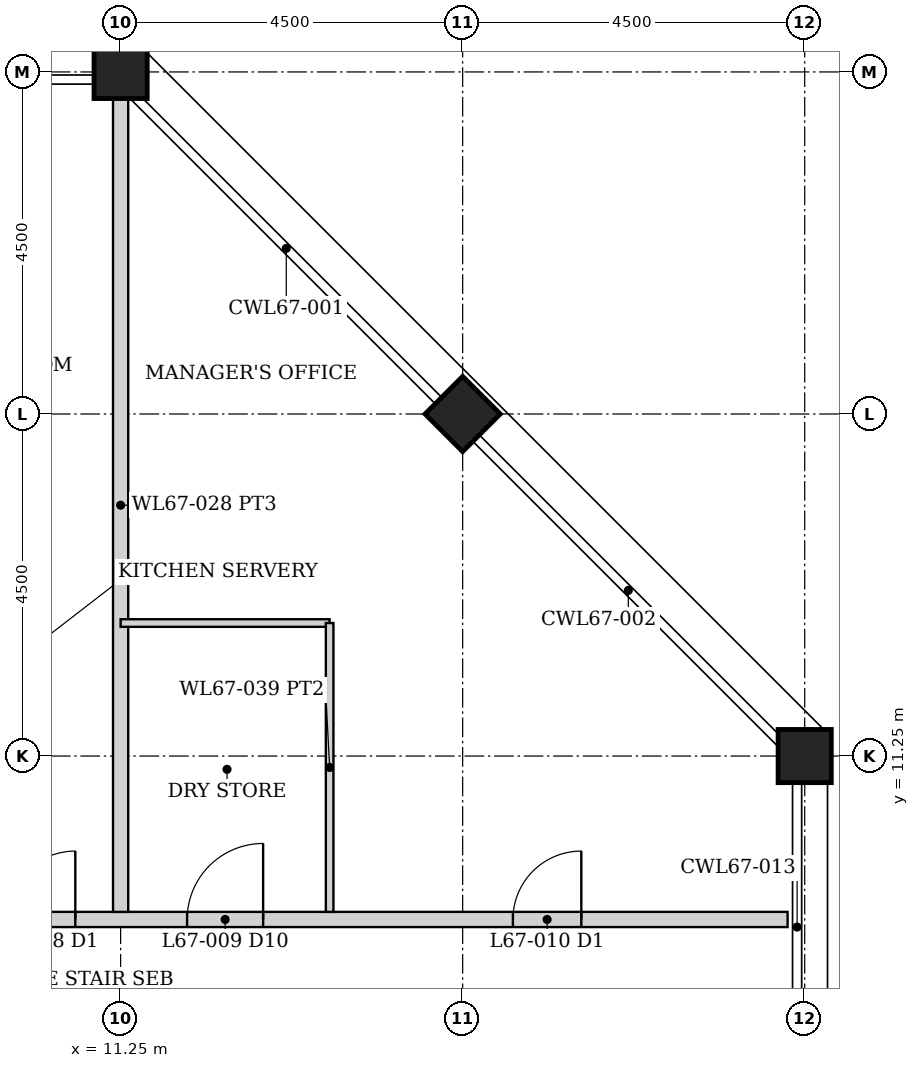
"""IFC4 building model, lengths in metres.
Left out: names, types, materials, properties, quantities, classifications, styles, units other than length and angle.
Written with IfcOpenShell. Run it as: python <this file> out.ifc"""

import sys

from ifc_helpers import new_model, si_unit, direction, frame, frame_2d, origin, origin_2d, place, context, subcontext, project, spatial, rectangle, hollow_rectangle, extrude, element, fill, save


model = new_model("IFC4")
c1 = context("Model", 3, precision=1e-05, world=origin(), true_north=direction((0.0, 1.0)))
c2 = subcontext(c1, "Body", "Model", "MODEL_VIEW")
j1 = project(units=[si_unit("LENGTHUNIT", "METRE"), si_unit("PLANEANGLEUNIT", "RADIAN")], contexts=[c1])
p1 = place(None, origin())
s1 = spatial("IfcSite", under=j1, at=p1, CompositionType="ELEMENT")
p2 = place(p1, origin())
s2 = spatial("IfcBuilding", under=s1, at=p2, CompositionType="ELEMENT")
p3 = place(p2, frame((0.0, 0.0, 257.05)))
s3 = spatial("IfcBuildingStorey", under=s2, at=p3, CompositionType="ELEMENT", Elevation=257.05)
for number, where, z_axis, x_axis in (
    (1, (11.25, 20.25, 0.0), (0.0, 0.0, 1.0), (0.0, 1.0, 0.0)),
    (2, (20.25, 11.25, 0.0), (0.0, 0.0, 1.0), (1.0, 0.0, 0.0)),
    (3, (15.75, 15.75, 0.0), (0.0, 0.0, 1.0), (0.707, 0.707, 0.0)),
):
    element("IfcColumn", number, at=place(p3, frame(where, z_axis=z_axis, x_axis=x_axis)), inside=s3, PredefinedType="COLUMN", context=c2, shape_type="SweptSolid", body=[
        extrude(hollow_rectangle(XDim=0.7, YDim=0.7, WallThickness=0.035, at=origin_2d()), origin(), (0.0, 0.0, 1.0), 5.0),
    ])
p4 = place(p3, frame((-20.025, 9.1, 0.0), z_axis=(0.0, 0.0, 1.0), x_axis=(1.0, 0.0, 0.0)))
e4 = element("IfcWall", 4, at=p4, inside=s3, PredefinedType="PARTITIONING", context=c2, shape_type="SweptSolid", body=[
    extrude(rectangle(XDim=40.05, YDim=0.2, at=frame_2d((20.025, 0.0))), origin(), (0.0, 0.0, 1.0), 3.823),
])
p5 = place(p4, frame((6.3, 0.0, 0.0)))
e5 = element("IfcOpeningElement", 5, at=p5, cuts=e4, PredefinedType="OPENING", context=c2, shape_type="SweptSolid", body=[
    extrude(rectangle(XDim=0.9, YDim=2.1, at=frame_2d((0.45, 1.05))), frame((0.0, 0.11, 0.0), z_axis=(0.0, -1.0, 0.0), x_axis=(1.0, 0.0, 0.0)), (0.0, 0.0, 1.0), 0.22),
])
p6 = place(p4, frame((13.772, 0.0, 0.0)))
e6 = element("IfcOpeningElement", 6, at=p6, cuts=e4, PredefinedType="OPENING", context=c2, shape_type="SweptSolid", body=[
    extrude(rectangle(XDim=1.8, YDim=2.1, at=frame_2d((0.9, 1.05))), frame((0.0, 0.11, 0.0), z_axis=(0.0, -1.0, 0.0), x_axis=(1.0, 0.0, 0.0)), (0.0, 0.0, 1.0), 0.22),
])
p7 = place(p4, frame((16.9, 0.0, 0.0)))
e7 = element("IfcOpeningElement", 7, at=p7, cuts=e4, PredefinedType="OPENING", context=c2, shape_type="SweptSolid", body=[
    extrude(rectangle(XDim=1.0, YDim=2.1, at=frame_2d((0.5, 1.05))), frame((0.0, 0.11, 0.0), z_axis=(0.0, -1.0, 0.0), x_axis=(1.0, 0.0, 0.0)), (0.0, 0.0, 1.0), 0.22),
])
p8 = place(p4, frame((22.025, 0.0, 0.0)))
e8 = element("IfcOpeningElement", 8, at=p8, cuts=e4, PredefinedType="OPENING", context=c2, shape_type="SweptSolid", body=[
    extrude(rectangle(XDim=1.5, YDim=2.1, at=frame_2d((0.75, 1.05))), frame((0.0, 0.11, 0.0), z_axis=(0.0, -1.0, 0.0), x_axis=(1.0, 0.0, 0.0)), (0.0, 0.0, 1.0), 0.22),
])
p9 = place(p4, frame((29.779, 0.0, 0.0)))
e9 = element("IfcOpeningElement", 9, at=p9, cuts=e4, PredefinedType="OPENING", context=c2, shape_type="SweptSolid", body=[
    extrude(rectangle(XDim=0.9, YDim=2.1, at=frame_2d((0.45, 1.05))), frame((0.0, 0.11, 0.0), z_axis=(0.0, -1.0, 0.0), x_axis=(1.0, 0.0, 0.0)), (0.0, 0.0, 1.0), 0.22),
])
p10 = place(p4, frame((36.436, 0.0, 0.0)))
e10 = element("IfcOpeningElement", 10, at=p10, cuts=e4, PredefinedType="OPENING", context=c2, shape_type="SweptSolid", body=[
    extrude(rectangle(XDim=0.9, YDim=2.1, at=frame_2d((0.45, 1.05))), frame((0.0, 0.11, 0.0), z_axis=(0.0, -1.0, 0.0), x_axis=(1.0, 0.0, 0.0)), (0.0, 0.0, 1.0), 0.22),
])
p11 = place(p4, frame((32.15, 0.0, 0.0)))
e11 = element("IfcOpeningElement", 11, at=p11, cuts=e4, PredefinedType="OPENING", context=c2, shape_type="SweptSolid", body=[
    extrude(rectangle(XDim=1.0, YDim=2.1, at=frame_2d((0.5, 1.05))), frame((0.0, 0.11, 0.0), z_axis=(0.0, -1.0, 0.0), x_axis=(1.0, 0.0, 0.0)), (0.0, 0.0, 1.0), 0.22),
])
p12 = place(p3, frame((11.25, 9.2, 0.0), z_axis=(0.0, 0.0, 1.0), x_axis=(0.0, 1.0, 0.0)))
e12 = element("IfcWall", 12, at=p12, inside=s3, PredefinedType="PARTITIONING", context=c2, shape_type="SweptSolid", body=[
    extrude(rectangle(XDim=10.7, YDim=0.2, at=frame_2d((5.35, 0.0))), origin(), (0.0, 0.0, 1.0), 3.823),
])
p13 = place(p3, frame((11.25, 13.0, 0.0), z_axis=(0.0, 0.0, 1.0), x_axis=(1.0, 0.0, 0.0)))
e13 = element("IfcWall", 13, at=p13, inside=s3, PredefinedType="PARTITIONING", context=c2, shape_type="SweptSolid", body=[
    extrude(rectangle(XDim=2.75, YDim=0.1, at=frame_2d((1.375, 0.0))), origin(), (0.0, 0.0, 1.0), 3.823),
])
p14 = place(p3, frame((14.0, 9.2, 0.0), z_axis=(0.0, 0.0, 1.0), x_axis=(0.0, 1.0, 0.0)))
e14 = element("IfcWall", 14, at=p14, inside=s3, PredefinedType="PARTITIONING", context=c2, shape_type="SweptSolid", body=[
    extrude(rectangle(XDim=3.8, YDim=0.1, at=frame_2d((1.9, 0.0))), origin(), (0.0, 0.0, 1.0), 3.823),
])
p15 = place(p9, origin())
e15 = element("IfcDoor", 15, at=p15, inside=s3, OperationType="SINGLE_SWING_RIGHT", PredefinedType="DOOR", context=c2, shape_type="SweptSolid", body=[
    extrude(rectangle(XDim=0.9, YDim=2.1, at=frame_2d((0.45, 1.05))), frame((0.0, 0.025, 0.0), z_axis=(0.0, -1.0, 0.0), x_axis=(1.0, 0.0, 0.0)), (0.0, 0.0, 1.0), 0.05),
])
fill(e9, e15)
p16 = place(p10, origin())
e16 = element("IfcDoor", 16, at=p16, inside=s3, OperationType="SINGLE_SWING_RIGHT", PredefinedType="DOOR", context=c2, shape_type="SweptSolid", body=[
    extrude(rectangle(XDim=0.9, YDim=2.1, at=frame_2d((0.45, 1.05))), frame((0.0, 0.025, 0.0), z_axis=(0.0, -1.0, 0.0), x_axis=(1.0, 0.0, 0.0)), (0.0, 0.0, 1.0), 0.05),
])
fill(e10, e16)
p17 = place(p11, origin())
e17 = element("IfcDoor", 17, at=p17, inside=s3, OperationType="SINGLE_SWING_RIGHT", PredefinedType="DOOR", context=c2, shape_type="SweptSolid", body=[
    extrude(rectangle(XDim=1.0, YDim=2.1, at=frame_2d((0.5, 1.05))), frame((0.0, 0.025, 0.0), z_axis=(0.0, -1.0, 0.0), x_axis=(1.0, 0.0, 0.0)), (0.0, 0.0, 1.0), 0.05),
])
fill(e11, e17)
save(model, sys.argv[1])
